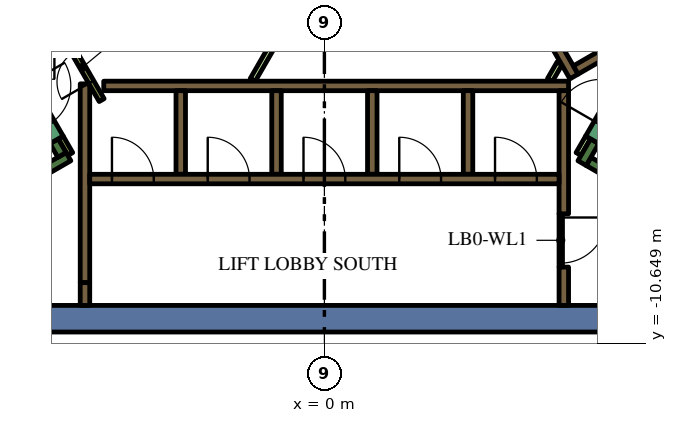
"""IFC4 building model, lengths in metres.
Left out: names, types, materials, properties, quantities, classifications, styles, units other than length and angle.
Written with IfcOpenShell. Run it as: python <this file> out.ifc"""

import sys

from ifc_helpers import new_model, si_unit, direction, frame, frame_2d, origin, place, context, subcontext, project, spatial, polyline, rectangle, outline, extrude, element, fill, save


model = new_model("IFC4")
c1 = context("Model", 3, precision=1e-05, world=origin(), true_north=direction((0.0, 1.0)))
c2 = subcontext(c1, "Body", "Model", "MODEL_VIEW")
j1 = project(units=[si_unit("LENGTHUNIT", "METRE"), si_unit("PLANEANGLEUNIT", "RADIAN")], contexts=[c1])
p1 = place(None, origin())
s1 = spatial("IfcSite", under=j1, at=p1, CompositionType="ELEMENT")
p2 = place(p1, origin())
s2 = spatial("IfcBuilding", under=s1, at=p2, CompositionType="ELEMENT")
p3 = place(p2, frame((0.0, 0.0, 210.0)))
s3 = spatial("IfcBuildingStorey", under=s2, at=p3, CompositionType="ELEMENT", Elevation=210.0)
p4 = place(p3, frame((-10.556, -10.0, 0.0), z_axis=(0.0, 0.0, 1.0), x_axis=(1.0, 0.0, 0.0)))
e1 = element("IfcWall", 1, at=p4, inside=s3, PredefinedType="SOLIDWALL", context=c2, shape_type="SweptSolid", body=[
    extrude(rectangle(XDim=19.461, YDim=0.7, at=frame_2d((9.73, 0.0))), origin(), (0.0, 0.0, 1.0), 4.2),
])
p5 = place(p3, frame((12.84, -9.261, 0.0), z_axis=(0.0, 0.0, 1.0), x_axis=(-0.866013990052, 0.500019768644, 0.0)))
e2 = element("IfcWall", 2, at=p5, inside=s3, PredefinedType="SOLIDWALL", context=c2, shape_type="SweptSolid", body=[
    extrude(rectangle(XDim=6.8, YDim=0.25, at=frame_2d((3.4, 0.0))), origin(), (0.0, 0.0, 1.0), 4.2),
])
p6 = place(p3, frame((7.113, -5.33, 0.0), z_axis=(0.0, 0.0, 1.0), x_axis=(-0.499965889992, -0.866045096311, 0.0)))
e3 = element("IfcWall", 3, at=p6, inside=s3, PredefinedType="SOLIDWALL", context=c2, shape_type="SweptSolid", body=[
    extrude(rectangle(XDim=0.666, YDim=0.25, at=frame_2d((0.333, 0.0))), origin(), (0.0, 0.0, 1.0), 4.2),
])
p7 = place(p3, frame((-12.84, -9.261, 0.0), z_axis=(0.0, 0.0, 1.0), x_axis=(0.866016039709, 0.500016218704, 0.0)))
e4 = element("IfcWall", 4, at=p7, inside=s3, PredefinedType="SOLIDWALL", context=c2, shape_type="SweptSolid", body=[
    extrude(rectangle(XDim=7.05, YDim=0.25, at=frame_2d((3.525, 0.0))), origin(), (0.0, 0.0, 1.0), 4.2),
])
p8 = place(p3, frame((-6.905, -5.69, 0.0), z_axis=(0.0, 0.0, 1.0), x_axis=(-0.499993700073, 0.866029041019, 0.0)))
e5 = element("IfcWall", 5, at=p8, inside=s3, PredefinedType="SOLIDWALL", context=c2, shape_type="SweptSolid", body=[
    extrude(rectangle(XDim=0.416, YDim=0.25, at=frame_2d((0.208, 0.0))), origin(), (0.0, 0.0, 1.0), 4.2),
])
p9 = place(p3, frame((-6.3, -9.05, 0.0), z_axis=(0.0, 0.0, 1.0), x_axis=(0.0, 1.0, 0.0)))
e6 = element("IfcWall", 6, at=p9, inside=s3, PredefinedType="SOLIDWALL", context=c2, shape_type="SweptSolid", body=[
    extrude(rectangle(XDim=5.23, YDim=0.25, at=frame_2d((2.615, 0.0))), origin(), (0.0, 0.0, 1.0), 4.2),
])
p10 = place(p3, frame((-6.3, -9.052, 0.0), z_axis=(0.0, 0.0, 1.0), x_axis=(0.0, -1.0, 0.0)))
e7 = element("IfcWall", 7, at=p10, inside=s3, PredefinedType="SOLIDWALL", context=c2, shape_type="SweptSolid", body=[
    extrude(rectangle(XDim=0.598, YDim=0.25, at=frame_2d((0.299, 0.0))), origin(), (0.0, 0.0, 1.0), 4.2),
])
p11 = place(p3, frame((-5.806, -3.875, 0.0), z_axis=(0.0, 0.0, 1.0), x_axis=(1.0, 0.0, 0.0)))
e8 = element("IfcWall", 8, at=p11, inside=s3, PredefinedType="SOLIDWALL", context=c2, shape_type="SweptSolid", body=[
    extrude(rectangle(XDim=12.231, YDim=0.25, at=frame_2d((6.116, 0.0))), origin(), (0.0, 0.0, 1.0), 4.2),
])
p12 = place(p3, frame((6.3, -7.24, 0.0), z_axis=(0.0, 0.0, 1.0), x_axis=(0.0, 1.0, 0.0)))
e9 = element("IfcWall", 9, at=p12, inside=s3, PredefinedType="SOLIDWALL", context=c2, shape_type="SweptSolid", body=[
    extrude(rectangle(XDim=3.24, YDim=0.25, at=frame_2d((1.62, 0.0))), origin(), (0.0, 0.0, 1.0), 4.2),
])
p13 = place(p3, frame((6.3, -9.65, 0.0), z_axis=(0.0, 0.0, 1.0), x_axis=(0.0, 1.0, 0.0)))
e10 = element("IfcWall", 10, at=p13, inside=s3, PredefinedType="SOLIDWALL", context=c2, shape_type="SweptSolid", body=[
    extrude(rectangle(XDim=1.008, YDim=0.25, at=frame_2d((0.504, 0.0))), origin(), (0.0, 0.0, 1.0), 4.2),
])
for number, where, z_axis, x_axis in (
    (11, (3.78, -4.0, 0.0), (0.0, 0.0, 1.0), (0.0, -1.0, 0.0)),
    (12, (1.26, -4.0, 0.0), (0.0, 0.0, 1.0), (0.0, -1.0, 0.0)),
    (13, (-1.26, -4.0, 0.0), (0.0, 0.0, 1.0), (0.0, -1.0, 0.0)),
    (14, (-3.78, -4.0, 0.0), (0.0, 0.0, 1.0), (0.0, -1.0, 0.0)),
):
    element("IfcWall", number, at=place(p3, frame(where, z_axis=z_axis, x_axis=x_axis)), inside=s3, PredefinedType="SOLIDWALL", context=c2, shape_type="SweptSolid", body=[
        extrude(rectangle(XDim=2.2, YDim=0.25, at=frame_2d((1.1, 0.0))), origin(), (0.0, 0.0, 1.0), 4.2),
    ])
p14 = place(p3, origin())
e15 = element("IfcWall", 15, at=p14, inside=s3, PredefinedType="SOLIDWALL", context=c2, shape_type="SweptSolid", body=[
    extrude(outline(polyline([(0.332, 6.925), (0.335, 6.925), (0.335, 6.925), (0.335, 6.925), (0.335, 7.075), (0.335, 7.075), (0.335, 7.075), (0.245, 7.075), (0.035, 7.439), (0.252, 7.564), (0.377, 7.348), (1.512, 5.382), (1.637, 5.165), (2.221, 4.153), (2.771, 3.199), (2.896, 2.983), (3.138, 2.564), (4.031, 1.017), (4.156, 0.801), (5.292, -1.165), (5.417, -1.382), (6.073, -2.519), (6.552, -3.348), (6.677, -3.564), (6.46, -3.689), (0.332, 6.925)])), origin(), (0.0, 0.0, 1.0), 4.2),
])
p15 = place(p3, frame((11.507, -0.631, 0.0), z_axis=(0.0, 0.0, 1.0), x_axis=(-0.866011447264, -0.500024172624, 0.0)))
e16 = element("IfcWall", 16, at=p15, inside=s3, PredefinedType="SOLIDWALL", context=c2, shape_type="SweptSolid", body=[
    extrude(rectangle(XDim=5.65, YDim=0.25, at=frame_2d((2.825, 0.0))), origin(), (0.0, 0.0, 1.0), 4.2),
])
p16 = place(p3, frame((-1.418, -2.907, 0.0), z_axis=(0.0, 0.0, 1.0), x_axis=(-0.499978056798, -0.866038072327, 0.0)))
e17 = element("IfcWall", 17, at=p16, inside=s3, PredefinedType="PARTITIONING", context=c2, shape_type="SweptSolid", body=[
    extrude(rectangle(XDim=0.937, YDim=0.15, at=frame_2d((0.469, 0.0))), origin(), (0.0, 0.0, 1.0), 3.45),
])
p17 = place(p3, frame((-6.94, -5.23, 0.0), z_axis=(0.0, 0.0, 1.0), x_axis=(0.499834152157, -0.86612113491, 0.0)))
e18 = element("IfcWall", 18, at=p17, inside=s3, PredefinedType="PARTITIONING", context=c2, shape_type="SweptSolid", body=[
    extrude(rectangle(XDim=0.505, YDim=0.15, at=frame_2d((0.252, 0.0))), origin(), (0.0, 0.0, 1.0), 4.2),
])
p18 = place(p3, frame((6.688, -5.667, 0.0), z_axis=(0.0, 0.0, 1.0), x_axis=(0.499834152157, 0.86612113491, 0.0)))
e19 = element("IfcWall", 19, at=p18, inside=s3, PredefinedType="PARTITIONING", context=c2, shape_type="SweptSolid", body=[
    extrude(rectangle(XDim=0.505, YDim=0.15, at=frame_2d((0.252, 0.0))), origin(), (0.0, 0.0, 1.0), 3.45),
])
p19 = place(p3, frame((5.936, -3.718, 0.0), z_axis=(0.0, 0.0, 1.0), x_axis=(0.499890179513, 0.866088799389, 0.0)))
e20 = element("IfcWall", 20, at=p19, inside=s3, PredefinedType="PARTITIONING", context=c2, shape_type="SweptSolid", body=[
    extrude(rectangle(XDim=0.504, YDim=0.15, at=frame_2d((0.252, 0.0))), origin(), (0.0, 0.0, 1.0), 3.45),
])
p20 = place(p3, frame((-6.175, -6.325, 0.0), z_axis=(0.0, 0.0, 1.0), x_axis=(1.0, 0.0, 0.0)))
e21 = element("IfcWall", 21, at=p20, inside=s3, PredefinedType="SOLIDWALL", context=c2, shape_type="SweptSolid", body=[
    extrude(rectangle(XDim=12.35, YDim=0.25, at=frame_2d((6.175, 0.0))), origin(), (0.0, 0.0, 1.0), 4.2),
])
p21 = place(p20, frame((0.585, 0.0, 0.0)))
e22 = element("IfcOpeningElement", 22, at=p21, cuts=e21, PredefinedType="OPENING", context=c2, shape_type="SweptSolid", body=[
    extrude(rectangle(XDim=1.1, YDim=2.1, at=frame_2d((0.55, 1.05))), frame((0.0, 0.135, 0.0), z_axis=(0.0, -1.0, 0.0), x_axis=(1.0, 0.0, 0.0)), (0.0, 0.0, 1.0), 0.27),
])
p22 = place(p20, frame((3.105, 0.0, 0.0)))
e23 = element("IfcOpeningElement", 23, at=p22, cuts=e21, PredefinedType="OPENING", context=c2, shape_type="SweptSolid", body=[
    extrude(rectangle(XDim=1.1, YDim=2.1, at=frame_2d((0.55, 1.05))), frame((0.0, 0.135, 0.0), z_axis=(0.0, -1.0, 0.0), x_axis=(1.0, 0.0, 0.0)), (0.0, 0.0, 1.0), 0.27),
])
p23 = place(p20, frame((5.625, 0.0, 0.0)))
e24 = element("IfcOpeningElement", 24, at=p23, cuts=e21, PredefinedType="OPENING", context=c2, shape_type="SweptSolid", body=[
    extrude(rectangle(XDim=1.1, YDim=2.1, at=frame_2d((0.55, 1.05))), frame((0.0, 0.135, 0.0), z_axis=(0.0, -1.0, 0.0), x_axis=(1.0, 0.0, 0.0)), (0.0, 0.0, 1.0), 0.27),
])
p24 = place(p20, frame((8.145, 0.0, 0.0)))
e25 = element("IfcOpeningElement", 25, at=p24, cuts=e21, PredefinedType="OPENING", context=c2, shape_type="SweptSolid", body=[
    extrude(rectangle(XDim=1.1, YDim=2.1, at=frame_2d((0.55, 1.05))), frame((0.0, 0.135, 0.0), z_axis=(0.0, -1.0, 0.0), x_axis=(1.0, 0.0, 0.0)), (0.0, 0.0, 1.0), 0.27),
])
p25 = place(p20, frame((10.665, 0.0, 0.0)))
e26 = element("IfcOpeningElement", 26, at=p25, cuts=e21, PredefinedType="OPENING", context=c2, shape_type="SweptSolid", body=[
    extrude(rectangle(XDim=1.1, YDim=2.1, at=frame_2d((0.55, 1.05))), frame((0.0, 0.135, 0.0), z_axis=(0.0, -1.0, 0.0), x_axis=(1.0, 0.0, 0.0)), (0.0, 0.0, 1.0), 0.27),
])
p26 = place(p3, frame((7.048, -5.292, 0.0), z_axis=(0.0, 0.0, 1.0), x_axis=(0.49994051562, 0.866059744384, 0.0)))
e27 = element("IfcWall", 27, at=p26, inside=s3, PredefinedType="SOLIDWALL", context=c2, shape_type="SweptSolid", body=[
    extrude(rectangle(XDim=2.1, YDim=0.4, at=frame_2d((1.05, 0.0))), origin(), (0.0, 0.0, 1.0), 4.2),
])
p27 = place(p26, frame((0.45, 0.0, 0.0)))
e28 = element("IfcOpeningElement", 28, at=p27, cuts=e27, PredefinedType="OPENING", context=c2, shape_type="SweptSolid", body=[
    extrude(rectangle(XDim=1.2, YDim=2.1, at=frame_2d((0.6, 1.05))), frame((0.0, 0.21, 0.0), z_axis=(0.0, -1.0, 0.0), x_axis=(1.0, 0.0, 0.0)), (0.0, 0.0, 1.0), 0.42),
])
p28 = place(p3, frame((-8.098, -3.474, 0.0), z_axis=(0.0, 0.0, 1.0), x_axis=(0.49994051562, -0.866059744384, 0.0)))
e29 = element("IfcWall", 29, at=p28, inside=s3, PredefinedType="SOLIDWALL", context=c2, shape_type="SweptSolid", body=[
    extrude(rectangle(XDim=2.1, YDim=0.4, at=frame_2d((1.05, 0.0))), origin(), (0.0, 0.0, 1.0), 4.2),
])
p29 = place(p28, frame((0.45, 0.0, 0.0)))
e30 = element("IfcOpeningElement", 30, at=p29, cuts=e29, PredefinedType="OPENING", context=c2, shape_type="SweptSolid", body=[
    extrude(rectangle(XDim=1.2, YDim=2.1, at=frame_2d((0.6, 1.05))), frame((0.0, 0.21, 0.0), z_axis=(0.0, -1.0, 0.0), x_axis=(1.0, 0.0, 0.0)), (0.0, 0.0, 1.0), 0.42),
])
p30 = place(p3, frame((-5.861, -4.248, 0.0), z_axis=(0.0, 0.0, 1.0), x_axis=(-0.500043646338, 0.866000203093, 0.0)))
e31 = element("IfcWall", 31, at=p30, inside=s3, PredefinedType="PARTITIONING", context=c2, shape_type="SweptSolid", body=[
    extrude(rectangle(XDim=1.93, YDim=0.15, at=frame_2d((0.965, 0.0))), origin(), (0.0, 0.0, 1.0), 4.2),
])
p31 = place(p30, frame((0.55, 0.0, 0.0)))
e32 = element("IfcOpeningElement", 32, at=p31, cuts=e31, PredefinedType="OPENING", context=c2, shape_type="SweptSolid", body=[
    extrude(rectangle(XDim=0.9, YDim=2.1, at=frame_2d((0.45, 1.05))), frame((0.0, 0.085, 0.0), z_axis=(0.0, -1.0, 0.0), x_axis=(1.0, 0.0, 0.0)), (0.0, 0.0, 1.0), 0.17),
])
p32 = place(p3, frame((6.22, -7.237, 0.0), z_axis=(0.0, 0.0, 1.0), x_axis=(0.0, -1.0, 0.0)))
e33 = element("IfcWall", 33, at=p32, inside=s3, PredefinedType="PARTITIONING", context=c2, shape_type="SweptSolid", body=[
    extrude(rectangle(XDim=1.4, YDim=0.09, at=frame_2d((0.7, 0.0))), origin(), (0.0, 0.0, 1.0), 3.45),
])
p33 = place(p32, frame((0.1, 0.0, 0.0)))
e34 = element("IfcOpeningElement", 34, at=p33, cuts=e33, PredefinedType="OPENING", context=c2, shape_type="SweptSolid", body=[
    extrude(rectangle(XDim=1.2, YDim=2.1, at=frame_2d((0.6, 1.05))), frame((0.0, 0.055, 0.0), z_axis=(0.0, -1.0, 0.0), x_axis=(1.0, 0.0, 0.0)), (0.0, 0.0, 1.0), 0.11),
])
p34 = place(p21, origin())
e35 = element("IfcDoor", 35, at=p34, inside=s3, OperationType="DOUBLE_DOOR_SLIDING", PredefinedType="DOOR", context=c2, shape_type="SweptSolid", body=[
    extrude(rectangle(XDim=1.1, YDim=2.1, at=frame_2d((0.55, 1.05))), frame((0.0, 0.025, 0.0), z_axis=(0.0, -1.0, 0.0), x_axis=(1.0, 0.0, 0.0)), (0.0, 0.0, 1.0), 0.05),
])
fill(e22, e35)
p35 = place(p22, origin())
e36 = element("IfcDoor", 36, at=p35, inside=s3, OperationType="DOUBLE_DOOR_SLIDING", PredefinedType="DOOR", context=c2, shape_type="SweptSolid", body=[
    extrude(rectangle(XDim=1.1, YDim=2.1, at=frame_2d((0.55, 1.05))), frame((0.0, 0.025, 0.0), z_axis=(0.0, -1.0, 0.0), x_axis=(1.0, 0.0, 0.0)), (0.0, 0.0, 1.0), 0.05),
])
fill(e23, e36)
p36 = place(p23, origin())
e37 = element("IfcDoor", 37, at=p36, inside=s3, OperationType="DOUBLE_DOOR_SLIDING", PredefinedType="DOOR", context=c2, shape_type="SweptSolid", body=[
    extrude(rectangle(XDim=1.1, YDim=2.1, at=frame_2d((0.55, 1.05))), frame((0.0, 0.025, 0.0), z_axis=(0.0, -1.0, 0.0), x_axis=(1.0, 0.0, 0.0)), (0.0, 0.0, 1.0), 0.05),
])
fill(e24, e37)
p37 = place(p24, origin())
e38 = element("IfcDoor", 38, at=p37, inside=s3, OperationType="DOUBLE_DOOR_SLIDING", PredefinedType="DOOR", context=c2, shape_type="SweptSolid", body=[
    extrude(rectangle(XDim=1.1, YDim=2.1, at=frame_2d((0.55, 1.05))), frame((0.0, 0.025, 0.0), z_axis=(0.0, -1.0, 0.0), x_axis=(1.0, 0.0, 0.0)), (0.0, 0.0, 1.0), 0.05),
])
fill(e25, e38)
p38 = place(p25, origin())
e39 = element("IfcDoor", 39, at=p38, inside=s3, OperationType="DOUBLE_DOOR_SLIDING", PredefinedType="DOOR", context=c2, shape_type="SweptSolid", body=[
    extrude(rectangle(XDim=1.1, YDim=2.1, at=frame_2d((0.55, 1.05))), frame((0.0, 0.025, 0.0), z_axis=(0.0, -1.0, 0.0), x_axis=(1.0, 0.0, 0.0)), (0.0, 0.0, 1.0), 0.05),
])
fill(e26, e39)
p39 = place(p31, origin())
e40 = element("IfcDoor", 40, at=p39, inside=s3, OperationType="SINGLE_SWING_LEFT", PredefinedType="DOOR", context=c2, shape_type="SweptSolid", body=[
    extrude(rectangle(XDim=0.9, YDim=2.1, at=frame_2d((0.45, 1.05))), frame((0.0, 0.025, 0.0), z_axis=(0.0, -1.0, 0.0), x_axis=(1.0, 0.0, 0.0)), (0.0, 0.0, 1.0), 0.05),
])
fill(e32, e40)
p40 = place(p33, origin())
e41 = element("IfcDoor", 41, at=p40, inside=s3, OperationType="SINGLE_SWING_LEFT", PredefinedType="DOOR", context=c2, shape_type="SweptSolid", body=[
    extrude(rectangle(XDim=1.2, YDim=2.1, at=frame_2d((0.6, 1.05))), frame((0.0, 0.025, 0.0), z_axis=(0.0, -1.0, 0.0), x_axis=(1.0, 0.0, 0.0)), (0.0, 0.0, 1.0), 0.05),
])
fill(e34, e41)
save(model, sys.argv[1])
